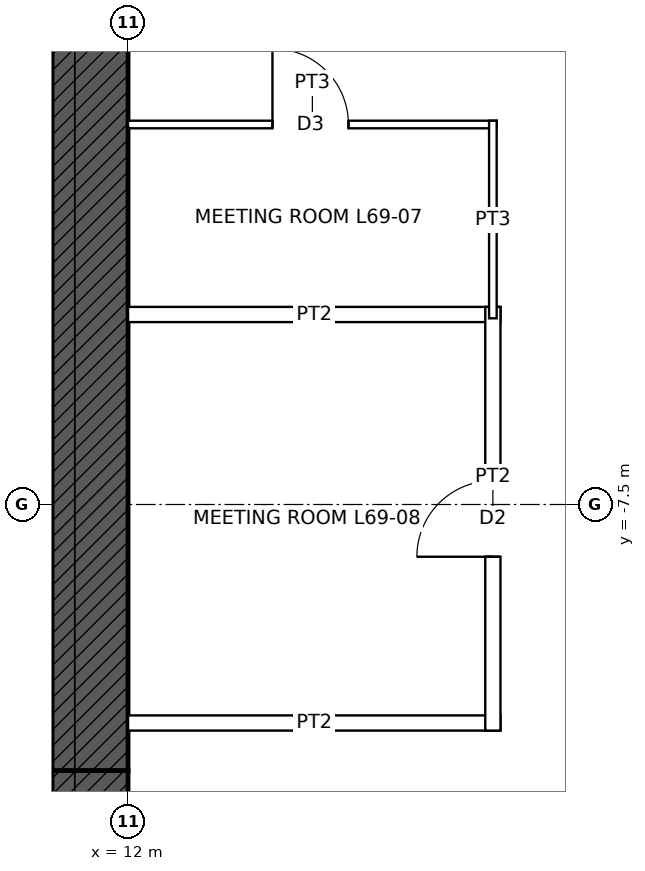
"""IFC4 building model, lengths in metres.
Left out: names, types, materials, properties, quantities, classifications, styles, units other than length and angle.
Written with IfcOpenShell. Run it as: python <this file> out.ifc"""

import sys

from ifc_helpers import new_model, si_unit, direction, frame, frame_2d, origin, place, context, subcontext, project, spatial, rectangle, extrude, element, fill, save


model = new_model("IFC4")
c1 = context("Model", 3, precision=1e-05, world=origin(), true_north=direction((0.0, 1.0)))
c2 = subcontext(c1, "Body", "Model", "MODEL_VIEW")
j1 = project(units=[si_unit("LENGTHUNIT", "METRE"), si_unit("PLANEANGLEUNIT", "RADIAN")], contexts=[c1])
p1 = place(None, origin())
s1 = spatial("IfcSite", under=j1, at=p1, CompositionType="ELEMENT")
p2 = place(p1, origin())
s2 = spatial("IfcBuilding", under=s1, at=p2, CompositionType="ELEMENT")
p3 = place(p2, frame((0.0, 0.0, 311.9)))
s3 = spatial("IfcBuildingStorey", under=s2, at=p3, CompositionType="ELEMENT", Elevation=311.9)
p4 = place(p3, frame((12.0, -11.5, 0.0), z_axis=(0.0, 0.0, 1.0), x_axis=(-1.0, 0.0, 0.0)))
e1 = element("IfcWall", 1, at=p4, inside=s3, PredefinedType="SHEAR", context=c2, shape_type="SweptSolid", body=[
    extrude(rectangle(XDim=24.0, YDim=1.0, at=frame_2d((12.0, 0.0))), origin(), (0.0, 0.0, 1.0), 4.0),
])
p5 = place(p4, frame((11.5, 0.0, 0.0)))
e2 = element("IfcOpeningElement", 2, at=p5, cuts=e1, PredefinedType="OPENING", context=c2, shape_type="SweptSolid", body=[
    extrude(rectangle(XDim=1.0, YDim=2.1, at=frame_2d((0.5, 1.05))), frame((0.0, 0.51, 0.0), z_axis=(0.0, -1.0, 0.0), x_axis=(1.0, 0.0, 0.0)), (0.0, 0.0, 1.0), 1.02),
])
p6 = place(p4, frame((1.0, 0.0, 0.0)))
e3 = element("IfcOpeningElement", 3, at=p6, cuts=e1, PredefinedType="OPENING", context=c2, shape_type="SweptSolid", body=[
    extrude(rectangle(XDim=1.0, YDim=2.4, at=frame_2d((0.5, 1.2))), frame((0.0, 0.51, 0.0), z_axis=(0.0, -1.0, 0.0), x_axis=(1.0, 0.0, 0.0)), (0.0, 0.0, 1.0), 1.02),
])
p7 = place(p3, frame((11.5, 11.0, 0.0), z_axis=(0.0, 0.0, 1.0), x_axis=(0.0, -1.0, 0.0)))
e4 = element("IfcWall", 4, at=p7, inside=s3, PredefinedType="SHEAR", context=c2, shape_type="SweptSolid", body=[
    extrude(rectangle(XDim=22.0, YDim=1.0, at=frame_2d((11.0, 0.0))), origin(), (0.0, 0.0, 1.0), 4.0),
])
p8 = place(p7, frame((10.5, 0.0, 0.0)))
e5 = element("IfcOpeningElement", 5, at=p8, cuts=e4, PredefinedType="OPENING", context=c2, shape_type="SweptSolid", body=[
    extrude(rectangle(XDim=1.0, YDim=2.4, at=frame_2d((0.5, 1.2))), frame((0.0, 0.51, 0.0), z_axis=(0.0, -1.0, 0.0), x_axis=(1.0, 0.0, 0.0)), (0.0, 0.0, 1.0), 1.02),
])
for number, where, z_axis, x_axis in (
    (6, (12.0, -10.375, 0.0), (0.0, 0.0, 1.0), (1.0, 0.0, 0.0)),
    (7, (12.0, -5.0, 0.0), (0.0, 0.0, 1.0), (1.0, 0.0, 0.0)),
):
    element("IfcWall", number, at=place(p3, frame(where, z_axis=z_axis, x_axis=x_axis)), inside=s3, PredefinedType="PARTITIONING", context=c2, shape_type="SweptSolid", body=[
        extrude(rectangle(XDim=4.9, YDim=0.2, at=frame_2d((2.45, 0.0))), origin(), (0.0, 0.0, 1.0), 3.85),
    ])
p9 = place(p3, frame((12.0, -2.5, 0.0), z_axis=(0.0, 0.0, 1.0), x_axis=(1.0, 0.0, 0.0)))
e8 = element("IfcWall", 8, at=p9, inside=s3, PredefinedType="PARTITIONING", context=c2, shape_type="SweptSolid", body=[
    extrude(rectangle(XDim=4.85, YDim=0.1, at=frame_2d((2.425, 0.0))), origin(), (0.0, 0.0, 1.0), 3.85),
])
p10 = place(p9, frame((1.9, 0.0, 0.0)))
e9 = element("IfcOpeningElement", 9, at=p10, cuts=e8, PredefinedType="OPENING", context=c2, shape_type="SweptSolid", body=[
    extrude(rectangle(XDim=1.0, YDim=2.1, at=frame_2d((0.5, 1.05))), frame((0.0, 0.06, 0.0), z_axis=(0.0, -1.0, 0.0), x_axis=(1.0, 0.0, 0.0)), (0.0, 0.0, 1.0), 0.12),
])
p11 = place(p3, frame((16.8, -10.475, 0.0), z_axis=(0.0, 0.0, 1.0), x_axis=(0.0, 1.0, 0.0)))
e10 = element("IfcWall", 10, at=p11, inside=s3, PredefinedType="PARTITIONING", context=c2, shape_type="SweptSolid", body=[
    extrude(rectangle(XDim=5.575, YDim=0.2, at=frame_2d((2.788, 0.0))), origin(), (0.0, 0.0, 1.0), 3.85),
])
p12 = place(p11, frame((2.288, 0.0, 0.0)))
e11 = element("IfcOpeningElement", 11, at=p12, cuts=e10, PredefinedType="OPENING", context=c2, shape_type="SweptSolid", body=[
    extrude(rectangle(XDim=1.0, YDim=2.1, at=frame_2d((0.5, 1.05))), frame((0.0, 0.11, 0.0), z_axis=(0.0, -1.0, 0.0), x_axis=(1.0, 0.0, 0.0)), (0.0, 0.0, 1.0), 0.22),
])
p13 = place(p3, frame((16.8, -5.05, 0.0), z_axis=(0.0, 0.0, 1.0), x_axis=(0.0, 1.0, 0.0)))
e12 = element("IfcWall", 12, at=p13, inside=s3, PredefinedType="PARTITIONING", context=c2, shape_type="SweptSolid", body=[
    extrude(rectangle(XDim=2.6, YDim=0.1, at=frame_2d((1.3, 0.0))), origin(), (0.0, 0.0, 1.0), 3.85),
])
p14 = place(p10, origin())
e13 = element("IfcDoor", 13, at=p14, inside=s3, OperationType="SINGLE_SWING_LEFT", PredefinedType="DOOR", context=c2, shape_type="SweptSolid", body=[
    extrude(rectangle(XDim=1.0, YDim=2.1, at=frame_2d((0.5, 1.05))), frame((0.0, 0.025, 0.0), z_axis=(0.0, -1.0, 0.0), x_axis=(1.0, 0.0, 0.0)), (0.0, 0.0, 1.0), 0.05),
])
fill(e9, e13)
p15 = place(p12, origin())
e14 = element("IfcDoor", 14, at=p15, inside=s3, OperationType="SINGLE_SWING_LEFT", PredefinedType="DOOR", context=c2, shape_type="SweptSolid", body=[
    extrude(rectangle(XDim=1.0, YDim=2.1, at=frame_2d((0.5, 1.05))), frame((0.0, 0.025, 0.0), z_axis=(0.0, -1.0, 0.0), x_axis=(1.0, 0.0, 0.0)), (0.0, 0.0, 1.0), 0.05),
])
fill(e11, e14)
save(model, sys.argv[1])
